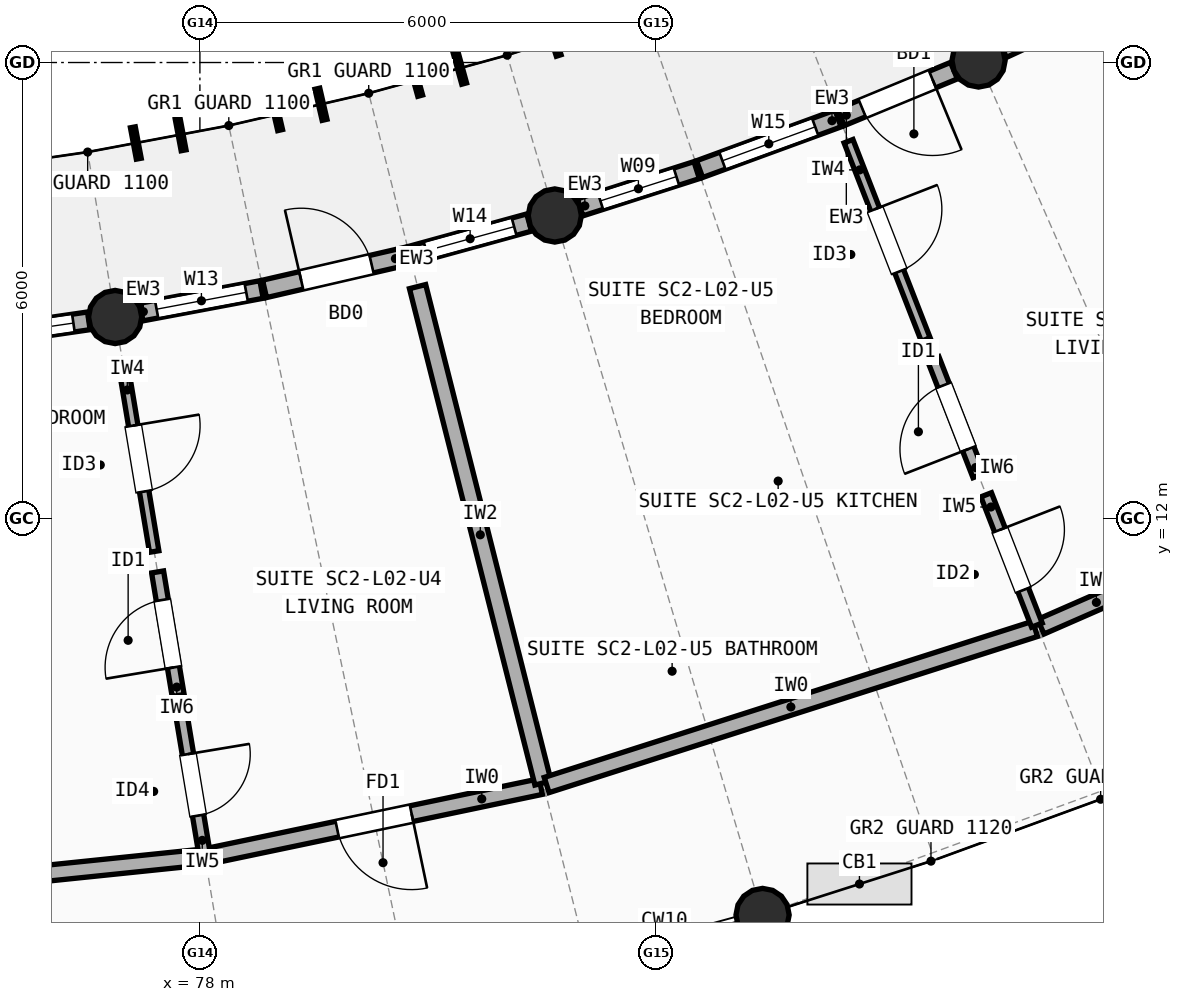
"""IFC4 building model, lengths in metres.
Left out: names, types, materials, properties, quantities, classifications, styles, units other than length and angle.
Written with IfcOpenShell. Run it as: python <this file> out.ifc"""

import sys

from ifc_helpers import new_model, si_unit, direction, frame, frame_2d, origin, origin_2d, place, context, subcontext, project, spatial, rectangle, circle, extrude, element, fill, save


model = new_model("IFC4")
c1 = context("Model", 3, precision=1e-05, world=origin(), true_north=direction((0.0, 1.0)))
c2 = subcontext(c1, "Body", "Model", "MODEL_VIEW")
j1 = project(units=[si_unit("LENGTHUNIT", "METRE"), si_unit("PLANEANGLEUNIT", "RADIAN")], contexts=[c1])
p1 = place(None, origin())
s1 = spatial("IfcSite", under=j1, at=p1, CompositionType="ELEMENT")
p2 = place(p1, origin())
s2 = spatial("IfcBuilding", under=s1, at=p2, CompositionType="ELEMENT")
p3 = place(p2, frame((0.0, 0.0, 7.7)))
s3 = spatial("IfcBuildingStorey", under=s2, at=p3, CompositionType="ELEMENT", Elevation=7.7)
for number, where, z_axis, x_axis in (
    (1, (76.885, 14.652, 0.0), (0.0, 0.0, 1.0), (1.0, 0.0, 0.0)),
    (2, (82.669, 15.988, 0.0), (0.0, 0.0, 1.0), (1.0, 0.0, 0.0)),
    (3, (85.403, 6.785, 0.0), (0.0, 0.0, 1.0), (1.0, 0.0, 0.0)),
    (4, (88.245, 18.027, 0.0), (0.0, 0.0, 1.0), (1.0, 0.0, 0.0)),
):
    element("IfcColumn", number, at=place(p3, frame(where, z_axis=z_axis, x_axis=x_axis)), inside=s3, PredefinedType="COLUMN", context=c2, shape_type="SweptSolid", body=[
        extrude(circle(Radius=0.35, at=origin_2d()), origin(), (0.0, 0.0, 1.0), 2.948),
    ])
p4 = place(p3, frame((74.945, 14.37, 0.0), z_axis=(0.0, 0.0, 1.0), x_axis=(0.98961312767, 0.143756243492, 0.0)))
e5 = element("IfcWall", 5, at=p4, inside=s3, PredefinedType="STANDARD", context=c2, shape_type="SweptSolid", body=[
    extrude(rectangle(XDim=1.61, YDim=0.235, at=frame_2d((0.805, 0.0))), origin(), (0.0, 0.0, 1.0), 2.684),
])
p5 = place(p4, frame((0.205, 0.0, 0.85)))
e6 = element("IfcOpeningElement", 6, at=p5, cuts=e5, PredefinedType="OPENING", context=c2, shape_type="SweptSolid", body=[
    extrude(rectangle(XDim=1.2, YDim=1.35, at=frame_2d((0.6, 0.675))), frame((0.0, 0.127, 0.0), z_axis=(0.0, -1.0, 0.0), x_axis=(1.0, 0.0, 0.0)), (0.0, 0.0, 1.0), 0.255),
])
p6 = place(p3, frame((77.229, 14.717, 0.0), z_axis=(0.0, 0.0, 1.0), x_axis=(0.982794848755, 0.184700528589, 0.0)))
e7 = element("IfcWall", 7, at=p6, inside=s3, PredefinedType="STANDARD", context=c2, shape_type="SweptSolid", body=[
    extrude(rectangle(XDim=1.61, YDim=0.235, at=frame_2d((0.805, 0.0))), origin(), (0.0, 0.0, 1.0), 2.684),
])
p7 = place(p6, frame((0.205, 0.0, 0.85)))
e8 = element("IfcOpeningElement", 8, at=p7, cuts=e7, PredefinedType="OPENING", context=c2, shape_type="SweptSolid", body=[
    extrude(rectangle(XDim=1.2, YDim=1.45, at=frame_2d((0.6, 0.725))), frame((0.0, 0.127, 0.0), z_axis=(0.0, -1.0, 0.0), x_axis=(1.0, 0.0, 0.0)), (0.0, 0.0, 1.0), 0.255),
])
p8 = place(p3, frame((78.85, 15.022, 0.0), z_axis=(0.0, 0.0, 1.0), x_axis=(0.974359373104, 0.224997360081, 0.0)))
e9 = element("IfcWall", 9, at=p8, inside=s3, PredefinedType="STANDARD", context=c2, shape_type="SweptSolid", body=[
    extrude(rectangle(XDim=1.94, YDim=0.235, at=frame_2d((0.97, 0.0))), origin(), (0.0, 0.0, 1.0), 2.684),
])
p9 = place(p8, frame((0.495, 0.0, 0.0)))
e10 = element("IfcOpeningElement", 10, at=p9, cuts=e9, PredefinedType="OPENING", context=c2, shape_type="SweptSolid", body=[
    extrude(rectangle(XDim=0.95, YDim=2.12, at=frame_2d((0.475, 1.06))), frame((0.0, 0.127, 0.0), z_axis=(0.0, -1.0, 0.0), x_axis=(1.0, 0.0, 0.0)), (0.0, 0.0, 1.0), 0.255),
])
p10 = place(p3, frame((80.779, 15.468, 0.0), z_axis=(0.0, 0.0, 1.0), x_axis=(0.96427223836, 0.264913288318, 0.0)))
e11 = element("IfcWall", 11, at=p10, inside=s3, PredefinedType="STANDARD", context=c2, shape_type="SweptSolid", body=[
    extrude(rectangle(XDim=1.61, YDim=0.235, at=frame_2d((0.805, 0.0))), origin(), (0.0, 0.0, 1.0), 2.684),
])
p11 = place(p10, frame((0.205, 0.0, 0.85)))
e12 = element("IfcOpeningElement", 12, at=p11, cuts=e11, PredefinedType="OPENING", context=c2, shape_type="SweptSolid", body=[
    extrude(rectangle(XDim=1.2, YDim=1.5, at=frame_2d((0.6, 0.75))), frame((0.0, 0.127, 0.0), z_axis=(0.0, -1.0, 0.0), x_axis=(1.0, 0.0, 0.0)), (0.0, 0.0, 1.0), 0.255),
])
p12 = place(p3, frame((83.003, 16.094, 0.0), z_axis=(0.0, 0.0, 1.0), x_axis=(0.952508629145, 0.304511594861, 0.0)))
e13 = element("IfcWall", 13, at=p12, inside=s3, PredefinedType="STANDARD", context=c2, shape_type="SweptSolid", body=[
    extrude(rectangle(XDim=1.61, YDim=0.235, at=frame_2d((0.805, 0.0))), origin(), (0.0, 0.0, 1.0), 2.684),
])
p13 = place(p12, frame((0.28, 0.0, 0.85)))
e14 = element("IfcOpeningElement", 14, at=p13, cuts=e13, PredefinedType="OPENING", context=c2, shape_type="SweptSolid", body=[
    extrude(rectangle(XDim=1.05, YDim=1.35, at=frame_2d((0.525, 0.675))), frame((0.0, 0.127, 0.0), z_axis=(0.0, -1.0, 0.0), x_axis=(1.0, 0.0, 0.0)), (0.0, 0.0, 1.0), 0.255),
])
p14 = place(p3, frame((84.574, 16.597, 0.0), z_axis=(0.0, 0.0, 1.0), x_axis=(0.939178301307, 0.343429932235, 0.0)))
e15 = element("IfcWall", 15, at=p14, inside=s3, PredefinedType="STANDARD", context=c2, shape_type="SweptSolid", body=[
    extrude(rectangle(XDim=1.94, YDim=0.235, at=frame_2d((0.97, 0.0))), origin(), (0.0, 0.0, 1.0), 2.684),
])
p15 = place(p14, frame((0.32, 0.0, 0.85)))
e16 = element("IfcOpeningElement", 16, at=p15, cuts=e15, PredefinedType="OPENING", context=c2, shape_type="SweptSolid", body=[
    extrude(rectangle(XDim=1.3, YDim=1.45, at=frame_2d((0.65, 0.725))), frame((0.0, 0.127, 0.0), z_axis=(0.0, -1.0, 0.0), x_axis=(1.0, 0.0, 0.0)), (0.0, 0.0, 1.0), 0.255),
])
p16 = place(p3, frame((86.433, 17.278, 0.0), z_axis=(0.0, 0.0, 1.0), x_axis=(0.924159027547, 0.382007973481, 0.0)))
e17 = element("IfcWall", 17, at=p16, inside=s3, PredefinedType="STANDARD", context=c2, shape_type="SweptSolid", body=[
    extrude(rectangle(XDim=1.61, YDim=0.235, at=frame_2d((0.805, 0.0))), origin(), (0.0, 0.0, 1.0), 2.684),
])
p17 = place(p16, frame((0.305, 0.0, 0.0)))
e18 = element("IfcOpeningElement", 18, at=p17, cuts=e17, PredefinedType="OPENING", context=c2, shape_type="SweptSolid", body=[
    extrude(rectangle(XDim=1.0, YDim=2.15, at=frame_2d((0.5, 1.075))), frame((0.0, 0.127, 0.0), z_axis=(0.0, -1.0, 0.0), x_axis=(1.0, 0.0, 0.0)), (0.0, 0.0, 1.0), 0.255),
])
p18 = place(p3, frame((88.562, 18.174, 0.0), z_axis=(0.0, 0.0, 1.0), x_axis=(0.907572868664, 0.419894615427, 0.0)))
e19 = element("IfcWall", 19, at=p18, inside=s3, PredefinedType="STANDARD", context=c2, shape_type="SweptSolid", body=[
    extrude(rectangle(XDim=1.61, YDim=0.235, at=frame_2d((0.805, 0.0))), origin(), (0.0, 0.0, 1.0), 2.684),
])
p19 = place(p18, frame((0.23, 0.0, 0.85)))
e20 = element("IfcOpeningElement", 20, at=p19, cuts=e19, PredefinedType="OPENING", context=c2, shape_type="SweptSolid", body=[
    extrude(rectangle(XDim=1.15, YDim=1.45, at=frame_2d((0.575, 0.725))), frame((0.0, 0.127, 0.0), z_axis=(0.0, -1.0, 0.0), x_axis=(1.0, 0.0, 0.0)), (0.0, 0.0, 1.0), 0.255),
])
p20 = place(p3, frame((71.316, 6.851, 0.0), z_axis=(0.0, 0.0, 1.0), x_axis=(0.994686939686, 0.10294606364, 0.0)))
e21 = element("IfcWall", 21, at=p20, inside=s3, PredefinedType="SOLIDWALL", context=c2, shape_type="SweptSolid", body=[
    extrude(rectangle(XDim=6.747, YDim=0.21, at=frame_2d((3.374, 0.0))), origin(), (0.0, 0.0, 1.0), 2.722),
])
p21 = place(p3, frame((78.107, 7.558, 0.0), z_axis=(0.0, 0.0, 1.0), x_axis=(0.978806148413, 0.204788973894, 0.0)))
e22 = element("IfcWall", 22, at=p21, inside=s3, PredefinedType="SOLIDWALL", context=c2, shape_type="SweptSolid", body=[
    extrude(rectangle(XDim=4.473, YDim=0.21, at=frame_2d((2.236, 0.0))), origin(), (0.0, 0.0, 1.0), 2.762),
])
p22 = place(p21, frame((1.737, 0.0, 0.0)))
e23 = element("IfcOpeningElement", 23, at=p22, cuts=e22, PredefinedType="OPENING", context=c2, shape_type="SweptSolid", body=[
    extrude(rectangle(XDim=1.0, YDim=2.15, at=frame_2d((0.5, 1.075))), frame((0.0, 0.115, 0.0), z_axis=(0.0, -1.0, 0.0), x_axis=(1.0, 0.0, 0.0)), (0.0, 0.0, 1.0), 0.23),
])
p23 = place(p3, frame((76.991, 14.013, 0.0), z_axis=(0.0, 0.0, 1.0), x_axis=(0.16420741421, -0.986425833562, 0.0)))
e24 = element("IfcWall", 24, at=p23, inside=s3, PredefinedType="PARTITIONING", context=c2, shape_type="SweptSolid", body=[
    extrude(rectangle(XDim=2.48, YDim=0.125, at=frame_2d((1.24, 0.0))), origin(), (0.0, 0.0, 1.0), 2.742),
])
p24 = place(p23, frame((0.8, 0.0, 0.0)))
e25 = element("IfcOpeningElement", 25, at=p24, cuts=e24, PredefinedType="OPENING", context=c2, shape_type="SweptSolid", body=[
    extrude(rectangle(XDim=0.88, YDim=2.1, at=frame_2d((0.44, 1.05))), frame((0.0, 0.073, 0.0), z_axis=(0.0, -1.0, 0.0), x_axis=(1.0, 0.0, 0.0)), (0.0, 0.0, 1.0), 0.145),
])
p25 = place(p3, frame((77.443, 11.298, 0.0), z_axis=(0.0, 0.0, 1.0), x_axis=(0.164158726706, -0.986433937193, 0.0)))
e26 = element("IfcWall", 26, at=p25, inside=s3, PredefinedType="PLUMBINGWALL", context=c2, shape_type="SweptSolid", body=[
    extrude(rectangle(XDim=1.648, YDim=0.16, at=frame_2d((0.824, 0.0))), origin(), (0.0, 0.0, 1.0), 2.742),
])
p26 = place(p25, frame((0.374, 0.0, 0.0)))
e27 = element("IfcOpeningElement", 27, at=p26, cuts=e26, PredefinedType="OPENING", context=c2, shape_type="SweptSolid", body=[
    extrude(rectangle(XDim=0.9, YDim=2.1, at=frame_2d((0.45, 1.05))), frame((0.0, 0.09, 0.0), z_axis=(0.0, -1.0, 0.0), x_axis=(1.0, 0.0, 0.0)), (0.0, 0.0, 1.0), 0.18),
])
p27 = place(p3, frame((77.759, 9.404, 0.0), z_axis=(0.0, 0.0, 1.0), x_axis=(0.164269882379, -0.986415432636, 0.0)))
e28 = element("IfcWall", 28, at=p27, inside=s3, PredefinedType="PARTITIONING", context=c2, shape_type="SweptSolid", body=[
    extrude(rectangle(XDim=1.84, YDim=0.15, at=frame_2d((0.92, 0.0))), origin(), (0.0, 0.0, 1.0), 2.742),
])
p28 = place(p27, frame((0.51, 0.0, 0.0)))
e29 = element("IfcOpeningElement", 29, at=p28, cuts=e28, PredefinedType="OPENING", context=c2, shape_type="SweptSolid", body=[
    extrude(rectangle(XDim=0.82, YDim=2.08, at=frame_2d((0.41, 1.04))), frame((0.0, 0.085, 0.0), z_axis=(0.0, -1.0, 0.0), x_axis=(1.0, 0.0, 0.0)), (0.0, 0.0, 1.0), 0.17),
])
p29 = place(p3, frame((80.864, 15.052, 0.0), z_axis=(0.0, 0.0, 1.0), x_axis=(0.244982481903, -0.969527505314, 0.0)))
e30 = element("IfcWall", 30, at=p29, inside=s3, PredefinedType="SOLIDWALL", context=c2, shape_type="SweptSolid", body=[
    extrude(rectangle(XDim=6.736, YDim=0.22, at=frame_2d((3.368, 0.0))), origin(), (0.0, 0.0, 1.0), 2.722),
])
p30 = place(p3, frame((82.562, 8.495, 0.0), z_axis=(0.0, 0.0, 1.0), x_axis=(0.952529122406, 0.304447484746, 0.0)))
e31 = element("IfcWall", 31, at=p30, inside=s3, PredefinedType="SOLIDWALL", context=c2, shape_type="SweptSolid", body=[
    extrude(rectangle(XDim=6.747, YDim=0.21, at=frame_2d((3.374, 0.0))), origin(), (0.0, 0.0, 1.0), 2.742),
])
p31 = place(p3, frame((89.064, 10.577, 0.0), z_axis=(0.0, 0.0, 1.0), x_axis=(0.91610596958, 0.40093621999, 0.0)))
e32 = element("IfcWall", 32, at=p31, inside=s3, PredefinedType="SOLIDWALL", context=c2, shape_type="SweptSolid", body=[
    extrude(rectangle(XDim=4.473, YDim=0.21, at=frame_2d((2.237, 0.0))), origin(), (0.0, 0.0, 1.0), 2.742),
])
p32 = place(p31, frame((1.747, 0.0, 0.0)))
e33 = element("IfcOpeningElement", 33, at=p32, cuts=e32, PredefinedType="OPENING", context=c2, shape_type="SweptSolid", body=[
    extrude(rectangle(XDim=0.98, YDim=2.15, at=frame_2d((0.49, 1.075))), frame((0.0, 0.115, 0.0), z_axis=(0.0, -1.0, 0.0), x_axis=(1.0, 0.0, 0.0)), (0.0, 0.0, 1.0), 0.23),
])
p33 = place(p3, frame((86.534, 16.965, 0.0), z_axis=(0.0, 0.0, 1.0), x_axis=(0.362896442288, -0.93182947591, 0.0)))
e34 = element("IfcWall", 34, at=p33, inside=s3, PredefinedType="PARTITIONING", context=c2, shape_type="SweptSolid", body=[
    extrude(rectangle(XDim=2.8, YDim=0.125, at=frame_2d((1.4, 0.0))), origin(), (0.0, 0.0, 1.0), 2.722),
])
p34 = place(p33, frame((0.96, 0.0, 0.0)))
e35 = element("IfcOpeningElement", 35, at=p34, cuts=e34, PredefinedType="OPENING", context=c2, shape_type="SweptSolid", body=[
    extrude(rectangle(XDim=0.88, YDim=2.1, at=frame_2d((0.44, 1.05))), frame((0.0, 0.073, 0.0), z_axis=(0.0, -1.0, 0.0), x_axis=(1.0, 0.0, 0.0)), (0.0, 0.0, 1.0), 0.145),
])
p35 = place(p3, frame((87.648, 14.102, 0.0), z_axis=(0.0, 0.0, 1.0), x_axis=(0.362817996081, -0.9318600226, 0.0)))
e36 = element("IfcWall", 36, at=p35, inside=s3, PredefinedType="PLUMBINGWALL", context=c2, shape_type="SweptSolid", body=[
    extrude(rectangle(XDim=1.648, YDim=0.16, at=frame_2d((0.824, 0.0))), origin(), (0.0, 0.0, 1.0), 2.722),
])
p36 = place(p35, frame((0.374, 0.0, 0.0)))
e37 = element("IfcOpeningElement", 37, at=p36, cuts=e36, PredefinedType="OPENING", context=c2, shape_type="SweptSolid", body=[
    extrude(rectangle(XDim=0.9, YDim=2.1, at=frame_2d((0.45, 1.05))), frame((0.0, 0.09, 0.0), z_axis=(0.0, -1.0, 0.0), x_axis=(1.0, 0.0, 0.0)), (0.0, 0.0, 1.0), 0.18),
])
p37 = place(p3, frame((88.345, 12.313, 0.0), z_axis=(0.0, 0.0, 1.0), x_axis=(0.362772804225, -0.931877616705, 0.0)))
e38 = element("IfcWall", 38, at=p37, inside=s3, PredefinedType="PARTITIONING", context=c2, shape_type="SweptSolid", body=[
    extrude(rectangle(XDim=1.84, YDim=0.15, at=frame_2d((0.92, 0.0))), origin(), (0.0, 0.0, 1.0), 2.722),
])
p38 = place(p37, frame((0.495, 0.0, 0.0)))
e39 = element("IfcOpeningElement", 39, at=p38, cuts=e38, PredefinedType="OPENING", context=c2, shape_type="SweptSolid", body=[
    extrude(rectangle(XDim=0.85, YDim=2.1, at=frame_2d((0.425, 1.05))), frame((0.0, 0.085, 0.0), z_axis=(0.0, -1.0, 0.0), x_axis=(1.0, 0.0, 0.0)), (0.0, 0.0, 1.0), 0.17),
])
p39 = place(p5, origin())
e40 = element("IfcWindow", 40, at=p39, inside=s3, PartitioningType="SINGLE_PANEL", PredefinedType="WINDOW", context=c2, shape_type="SweptSolid", body=[
    extrude(rectangle(XDim=1.2, YDim=1.35, at=frame_2d((0.6, 0.675))), frame((0.0, 0.03, 0.0), z_axis=(0.0, -1.0, 0.0), x_axis=(1.0, 0.0, 0.0)), (0.0, 0.0, 1.0), 0.06),
])
fill(e6, e40)
p40 = place(p7, origin())
e41 = element("IfcWindow", 41, at=p40, inside=s3, PartitioningType="SINGLE_PANEL", PredefinedType="WINDOW", context=c2, shape_type="SweptSolid", body=[
    extrude(rectangle(XDim=1.2, YDim=1.45, at=frame_2d((0.6, 0.725))), frame((0.0, 0.03, 0.0), z_axis=(0.0, -1.0, 0.0), x_axis=(1.0, 0.0, 0.0)), (0.0, 0.0, 1.0), 0.06),
])
fill(e8, e41)
p41 = place(p9, origin())
e42 = element("IfcDoor", 42, at=p41, inside=s3, OperationType="SINGLE_SWING_LEFT", PredefinedType="DOOR", context=c2, shape_type="SweptSolid", body=[
    extrude(rectangle(XDim=0.95, YDim=2.12, at=frame_2d((0.475, 1.06))), frame((0.0, 0.025, 0.0), z_axis=(0.0, -1.0, 0.0), x_axis=(1.0, 0.0, 0.0)), (0.0, 0.0, 1.0), 0.05),
])
fill(e10, e42)
p42 = place(p11, origin())
e43 = element("IfcWindow", 43, at=p42, inside=s3, PartitioningType="SINGLE_PANEL", PredefinedType="WINDOW", context=c2, shape_type="SweptSolid", body=[
    extrude(rectangle(XDim=1.2, YDim=1.5, at=frame_2d((0.6, 0.75))), frame((0.0, 0.03, 0.0), z_axis=(0.0, -1.0, 0.0), x_axis=(1.0, 0.0, 0.0)), (0.0, 0.0, 1.0), 0.06),
])
fill(e12, e43)
p43 = place(p13, origin())
e44 = element("IfcWindow", 44, at=p43, inside=s3, PartitioningType="SINGLE_PANEL", PredefinedType="WINDOW", context=c2, shape_type="SweptSolid", body=[
    extrude(rectangle(XDim=1.05, YDim=1.35, at=frame_2d((0.525, 0.675))), frame((0.0, 0.03, 0.0), z_axis=(0.0, -1.0, 0.0), x_axis=(1.0, 0.0, 0.0)), (0.0, 0.0, 1.0), 0.06),
])
fill(e14, e44)
p44 = place(p15, origin())
e45 = element("IfcWindow", 45, at=p44, inside=s3, PartitioningType="SINGLE_PANEL", PredefinedType="WINDOW", context=c2, shape_type="SweptSolid", body=[
    extrude(rectangle(XDim=1.3, YDim=1.45, at=frame_2d((0.65, 0.725))), frame((0.0, 0.03, 0.0), z_axis=(0.0, -1.0, 0.0), x_axis=(1.0, 0.0, 0.0)), (0.0, 0.0, 1.0), 0.06),
])
fill(e16, e45)
p45 = place(p17, origin())
e46 = element("IfcDoor", 46, at=p45, inside=s3, OperationType="SINGLE_SWING_RIGHT", PredefinedType="DOOR", context=c2, shape_type="SweptSolid", body=[
    extrude(rectangle(XDim=1.0, YDim=2.15, at=frame_2d((0.5, 1.075))), frame((0.0, 0.025, 0.0), z_axis=(0.0, -1.0, 0.0), x_axis=(1.0, 0.0, 0.0)), (0.0, 0.0, 1.0), 0.05),
])
fill(e18, e46)
p46 = place(p22, origin())
e47 = element("IfcDoor", 47, at=p46, inside=s3, OperationType="SINGLE_SWING_RIGHT", PredefinedType="DOOR", context=c2, shape_type="SweptSolid", body=[
    extrude(rectangle(XDim=1.0, YDim=2.15, at=frame_2d((0.5, 1.075))), frame((0.0, 0.025, 0.0), z_axis=(0.0, -1.0, 0.0), x_axis=(1.0, 0.0, 0.0)), (0.0, 0.0, 1.0), 0.05),
])
fill(e23, e47)
p47 = place(p24, origin())
e48 = element("IfcDoor", 48, at=p47, inside=s3, OperationType="SINGLE_SWING_LEFT", PredefinedType="DOOR", context=c2, shape_type="SweptSolid", body=[
    extrude(rectangle(XDim=0.88, YDim=2.1, at=frame_2d((0.44, 1.05))), frame((0.0, 0.025, 0.0), z_axis=(0.0, -1.0, 0.0), x_axis=(1.0, 0.0, 0.0)), (0.0, 0.0, 1.0), 0.05),
])
fill(e25, e48)
p48 = place(p26, origin())
e49 = element("IfcDoor", 49, at=p48, inside=s3, OperationType="SINGLE_SWING_RIGHT", PredefinedType="DOOR", context=c2, shape_type="SweptSolid", body=[
    extrude(rectangle(XDim=0.9, YDim=2.1, at=frame_2d((0.45, 1.05))), frame((0.0, 0.025, 0.0), z_axis=(0.0, -1.0, 0.0), x_axis=(1.0, 0.0, 0.0)), (0.0, 0.0, 1.0), 0.05),
])
fill(e27, e49)
p49 = place(p28, origin())
e50 = element("IfcDoor", 50, at=p49, inside=s3, OperationType="SINGLE_SWING_LEFT", PredefinedType="DOOR", context=c2, shape_type="SweptSolid", body=[
    extrude(rectangle(XDim=0.82, YDim=2.08, at=frame_2d((0.41, 1.04))), frame((0.0, 0.025, 0.0), z_axis=(0.0, -1.0, 0.0), x_axis=(1.0, 0.0, 0.0)), (0.0, 0.0, 1.0), 0.05),
])
fill(e29, e50)
p50 = place(p34, origin())
e51 = element("IfcDoor", 51, at=p50, inside=s3, OperationType="SINGLE_SWING_LEFT", PredefinedType="DOOR", context=c2, shape_type="SweptSolid", body=[
    extrude(rectangle(XDim=0.88, YDim=2.1, at=frame_2d((0.44, 1.05))), frame((0.0, 0.025, 0.0), z_axis=(0.0, -1.0, 0.0), x_axis=(1.0, 0.0, 0.0)), (0.0, 0.0, 1.0), 0.05),
])
fill(e35, e51)
p51 = place(p36, origin())
e52 = element("IfcDoor", 52, at=p51, inside=s3, OperationType="SINGLE_SWING_RIGHT", PredefinedType="DOOR", context=c2, shape_type="SweptSolid", body=[
    extrude(rectangle(XDim=0.9, YDim=2.1, at=frame_2d((0.45, 1.05))), frame((0.0, 0.025, 0.0), z_axis=(0.0, -1.0, 0.0), x_axis=(1.0, 0.0, 0.0)), (0.0, 0.0, 1.0), 0.05),
])
fill(e37, e52)
p52 = place(p38, origin())
e53 = element("IfcDoor", 53, at=p52, inside=s3, OperationType="SINGLE_SWING_LEFT", PredefinedType="DOOR", context=c2, shape_type="SweptSolid", body=[
    extrude(rectangle(XDim=0.85, YDim=2.1, at=frame_2d((0.425, 1.05))), frame((0.0, 0.025, 0.0), z_axis=(0.0, -1.0, 0.0), x_axis=(1.0, 0.0, 0.0)), (0.0, 0.0, 1.0), 0.05),
])
fill(e39, e53)
save(model, sys.argv[1])
